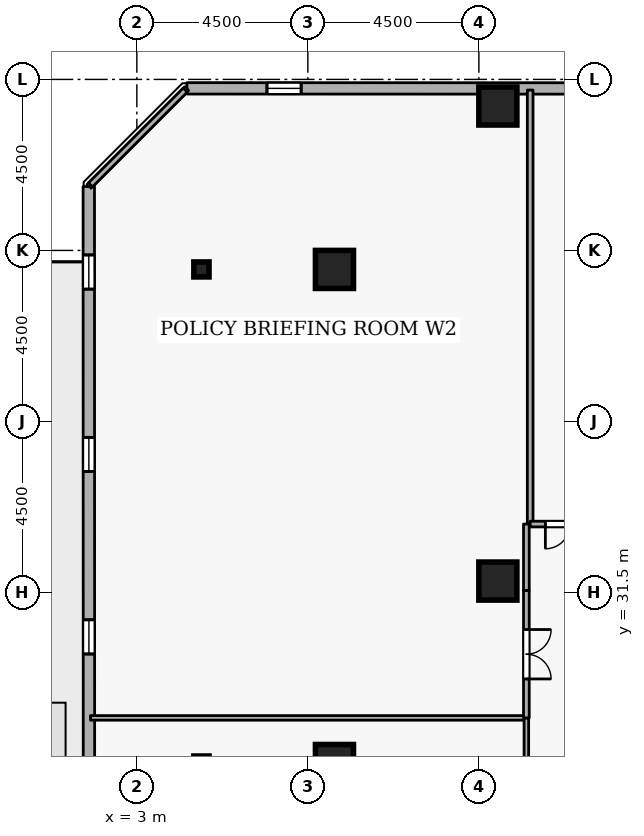
"""IFC4 building model, lengths in metres.
Left out: names, types, materials, properties, quantities, classifications, styles, units other than length and angle.
Written with IfcOpenShell. Run it as: python <this file> out.ifc"""

import sys

from ifc_helpers import new_model, si_unit, direction, frame, frame_2d, origin, origin_2d, place, context, subcontext, project, spatial, rectangle, i_section, extrude, element, fill, save


model = new_model("IFC4")
c1 = context("Model", 3, precision=1e-05, world=origin(), true_north=direction((0.0, 1.0)))
c2 = subcontext(c1, "Body", "Model", "MODEL_VIEW")
j1 = project(units=[si_unit("LENGTHUNIT", "METRE"), si_unit("PLANEANGLEUNIT", "RADIAN")], contexts=[c1])
p1 = place(None, origin())
s1 = spatial("IfcSite", under=j1, at=p1, CompositionType="ELEMENT")
p2 = place(p1, origin())
s2 = spatial("IfcBuilding", under=s1, at=p2, CompositionType="ELEMENT")
p3 = place(p2, frame((0.0, 0.0, 240.3)))
s3 = spatial("IfcBuildingStorey", under=s2, at=p3, CompositionType="ELEMENT", Elevation=240.3)
for number, where, z_axis, x_axis in (
    (1, (12.5, 44.3, 0.0), (0.0, 0.0, 1.0), (1.0, 0.0, 0.0)),
    (2, (8.2, 27.0, 0.0), (0.0, 0.0, 1.0), (1.0, 0.0, 0.0)),
    (3, (8.2, 40.0, 0.0), (0.0, 0.0, 1.0), (1.0, 0.0, 0.0)),
    (4, (12.5, 31.8, 0.0), (0.0, 0.0, 1.0), (1.0, 0.0, 0.0)),
):
    element("IfcColumn", number, at=place(p3, frame(where, z_axis=z_axis, x_axis=x_axis)), inside=s3, PredefinedType="COLUMN", context=c2, shape_type="SweptSolid", body=[
        extrude(rectangle(XDim=1.0, YDim=1.0, at=origin_2d()), origin(), (0.0, 0.0, 1.0), 3.6),
    ])
p4 = place(p3, frame((4.7, 40.0, 0.0), z_axis=(0.0, 0.0, 1.0), x_axis=(1.0, 0.0, 0.0)))
e5 = element("IfcColumn", 5, at=p4, inside=s3, PredefinedType="COLUMN", context=c2, shape_type="SweptSolid", body=[
    extrude(i_section(OverallWidth=0.399, OverallDepth=0.394, WebThickness=0.023, FlangeThickness=0.037, FilletRadius=0.015, at=origin_2d()), origin(), (0.0, 0.0, 1.0), 3.6),
])
p5 = place(p3, frame((37.924, 44.756, 0.0), z_axis=(0.0, 0.0, 1.0), x_axis=(-0.999999963872, 0.000268805477, 0.0)))
e6 = element("IfcWall", 6, at=p5, inside=s3, PredefinedType="STANDARD", context=c2, shape_type="SweptSolid", body=[
    extrude(rectangle(XDim=33.605, YDim=0.3, at=frame_2d((16.802, 0.0))), origin(), (0.0, 0.0, 1.0), 2.7),
])
p6 = place(p5, frame((6.6, 0.0, 0.72)))
e7 = element("IfcOpeningElement", 7, at=p6, cuts=e6, PredefinedType="OPENING", context=c2, shape_type="SweptSolid", body=[
    extrude(rectangle(XDim=0.9, YDim=1.75, at=frame_2d((0.45, 0.875))), frame((0.0, 0.16, 0.0), z_axis=(0.0, -1.0, 0.0), x_axis=(1.0, 0.0, 0.0)), (0.0, 0.0, 1.0), 0.32),
])
p7 = place(p5, frame((16.2, 0.0, 0.72)))
e8 = element("IfcOpeningElement", 8, at=p7, cuts=e6, PredefinedType="OPENING", context=c2, shape_type="SweptSolid", body=[
    extrude(rectangle(XDim=0.9, YDim=1.75, at=frame_2d((0.45, 0.875))), frame((0.0, 0.16, 0.0), z_axis=(0.0, -1.0, 0.0), x_axis=(1.0, 0.0, 0.0)), (0.0, 0.0, 1.0), 0.32),
])
p8 = place(p5, frame((21.0, 0.0, 0.72)))
e9 = element("IfcOpeningElement", 9, at=p8, cuts=e6, PredefinedType="OPENING", context=c2, shape_type="SweptSolid", body=[
    extrude(rectangle(XDim=0.9, YDim=1.75, at=frame_2d((0.45, 0.875))), frame((0.0, 0.16, 0.0), z_axis=(0.0, -1.0, 0.0), x_axis=(1.0, 0.0, 0.0)), (0.0, 0.0, 1.0), 0.32),
])
p9 = place(p5, frame((30.6, 0.0, 0.72)))
e10 = element("IfcOpeningElement", 10, at=p9, cuts=e6, PredefinedType="OPENING", context=c2, shape_type="SweptSolid", body=[
    extrude(rectangle(XDim=0.9, YDim=1.75, at=frame_2d((0.45, 0.875))), frame((0.0, 0.16, 0.0), z_axis=(0.0, -1.0, 0.0), x_axis=(1.0, 0.0, 0.0)), (0.0, 0.0, 1.0), 0.32),
])
p10 = place(p3, frame((1.735, 42.181, 0.0), z_axis=(0.0, 0.0, 1.0), x_axis=(0.000268805477, -0.999999963872, 0.0)))
e11 = element("IfcWall", 11, at=p10, inside=s3, PredefinedType="STANDARD", context=c2, shape_type="SweptSolid", body=[
    extrude(rectangle(XDim=33.605, YDim=0.3, at=frame_2d((16.802, 0.0))), origin(), (0.0, 0.0, 1.0), 2.7),
])
p11 = place(p10, frame((18.603, 0.0, 0.0)))
e12 = element("IfcOpeningElement", 12, at=p11, cuts=e11, PredefinedType="OPENING", context=c2, shape_type="SweptSolid", body=[
    extrude(rectangle(XDim=1.0, YDim=2.08, at=frame_2d((0.5, 1.04))), frame((0.0, 0.16, 0.0), z_axis=(0.0, -1.0, 0.0), x_axis=(1.0, 0.0, 0.0)), (0.0, 0.0, 1.0), 0.32),
])
p12 = place(p10, frame((1.8, 0.0, 0.72)))
e13 = element("IfcOpeningElement", 13, at=p12, cuts=e11, PredefinedType="OPENING", context=c2, shape_type="SweptSolid", body=[
    extrude(rectangle(XDim=0.9, YDim=1.75, at=frame_2d((0.45, 0.875))), frame((0.0, 0.16, 0.0), z_axis=(0.0, -1.0, 0.0), x_axis=(1.0, 0.0, 0.0)), (0.0, 0.0, 1.0), 0.32),
])
p13 = place(p10, frame((6.6, 0.0, 0.72)))
e14 = element("IfcOpeningElement", 14, at=p13, cuts=e11, PredefinedType="OPENING", context=c2, shape_type="SweptSolid", body=[
    extrude(rectangle(XDim=0.9, YDim=1.75, at=frame_2d((0.45, 0.875))), frame((0.0, 0.16, 0.0), z_axis=(0.0, -1.0, 0.0), x_axis=(1.0, 0.0, 0.0)), (0.0, 0.0, 1.0), 0.32),
])
p14 = place(p10, frame((11.4, 0.0, 0.72)))
e15 = element("IfcOpeningElement", 15, at=p14, cuts=e11, PredefinedType="OPENING", context=c2, shape_type="SweptSolid", body=[
    extrude(rectangle(XDim=0.9, YDim=1.75, at=frame_2d((0.45, 0.875))), frame((0.0, 0.16, 0.0), z_axis=(0.0, -1.0, 0.0), x_axis=(1.0, 0.0, 0.0)), (0.0, 0.0, 1.0), 0.32),
])
p15 = place(p10, frame((16.2, 0.0, 0.72)))
e16 = element("IfcOpeningElement", 16, at=p15, cuts=e11, PredefinedType="OPENING", context=c2, shape_type="SweptSolid", body=[
    extrude(rectangle(XDim=0.9, YDim=1.75, at=frame_2d((0.45, 0.875))), frame((0.0, 0.16, 0.0), z_axis=(0.0, -1.0, 0.0), x_axis=(1.0, 0.0, 0.0)), (0.0, 0.0, 1.0), 0.32),
])
p16 = place(p10, frame((21.0, 0.0, 0.72)))
e17 = element("IfcOpeningElement", 17, at=p16, cuts=e11, PredefinedType="OPENING", context=c2, shape_type="SweptSolid", body=[
    extrude(rectangle(XDim=0.9, YDim=1.75, at=frame_2d((0.45, 0.875))), frame((0.0, 0.16, 0.0), z_axis=(0.0, -1.0, 0.0), x_axis=(1.0, 0.0, 0.0)), (0.0, 0.0, 1.0), 0.32),
])
p17 = place(p10, frame((25.8, 0.0, 0.72)))
e18 = element("IfcOpeningElement", 18, at=p17, cuts=e11, PredefinedType="OPENING", context=c2, shape_type="SweptSolid", body=[
    extrude(rectangle(XDim=0.9, YDim=1.75, at=frame_2d((0.45, 0.875))), frame((0.0, 0.16, 0.0), z_axis=(0.0, -1.0, 0.0), x_axis=(1.0, 0.0, 0.0)), (0.0, 0.0, 1.0), 0.32),
])
p18 = place(p10, frame((30.6, 0.0, 0.72)))
e19 = element("IfcOpeningElement", 19, at=p18, cuts=e11, PredefinedType="OPENING", context=c2, shape_type="SweptSolid", body=[
    extrude(rectangle(XDim=0.9, YDim=1.75, at=frame_2d((0.45, 0.875))), frame((0.0, 0.16, 0.0), z_axis=(0.0, -1.0, 0.0), x_axis=(1.0, 0.0, 0.0)), (0.0, 0.0, 1.0), 0.32),
])
p19 = place(p3, frame((13.35, 33.3, 0.0), z_axis=(0.0, 0.0, 1.0), x_axis=(0.0, 1.0, 0.0)))
e20 = element("IfcWall", 20, at=p19, inside=s3, PredefinedType="PARTITIONING", context=c2, shape_type="SweptSolid", body=[
    extrude(rectangle(XDim=11.42, YDim=0.15, at=frame_2d((5.71, 0.0))), origin(), (0.0, 0.0, 1.0), 3.34),
])
p20 = place(p3, frame((15.45, 33.3, 0.0), z_axis=(0.0, 0.0, 1.0), x_axis=(-1.0, 0.0, 0.0)))
e21 = element("IfcWall", 21, at=p20, inside=s3, PredefinedType="PARTITIONING", context=c2, shape_type="SweptSolid", body=[
    extrude(rectangle(XDim=2.1, YDim=0.15, at=frame_2d((1.05, 0.0))), origin(), (0.0, 0.0, 1.0), 3.34),
])
p21 = place(p20, frame((0.4, 0.0, 0.0)))
e22 = element("IfcOpeningElement", 22, at=p21, cuts=e21, PredefinedType="OPENING", context=c2, shape_type="SweptSolid", body=[
    extrude(rectangle(XDim=1.3, YDim=2.12, at=frame_2d((0.65, 1.06))), frame((0.0, 0.085, 0.0), z_axis=(0.0, -1.0, 0.0), x_axis=(1.0, 0.0, 0.0)), (0.0, 0.0, 1.0), 0.17),
])
p22 = place(p3, frame((1.78, 28.2, 0.0), z_axis=(0.0, 0.0, 1.0), x_axis=(1.0, 0.0, 0.0)))
e23 = element("IfcWall", 23, at=p22, inside=s3, PredefinedType="PARTITIONING", context=c2, shape_type="SweptSolid", body=[
    extrude(rectangle(XDim=11.47, YDim=0.12, at=frame_2d((5.735, 0.0))), origin(), (0.0, 0.0, 1.0), 3.34),
])
p23 = place(p3, frame((13.25, 28.2, 0.0), z_axis=(0.0, 0.0, 1.0), x_axis=(0.0, -1.0, 0.0)))
e24 = element("IfcWall", 24, at=p23, inside=s3, PredefinedType="PARTITIONING", context=c2, shape_type="SweptSolid", body=[
    extrude(rectangle(XDim=5.75, YDim=0.12, at=frame_2d((2.875, 0.0))), origin(), (0.0, 0.0, 1.0), 3.34),
])
p24 = place(p23, frame((2.35, 0.0, 0.0)))
e25 = element("IfcOpeningElement", 25, at=p24, cuts=e24, PredefinedType="OPENING", context=c2, shape_type="SweptSolid", body=[
    extrude(rectangle(XDim=1.05, YDim=2.1, at=frame_2d((0.525, 1.05))), frame((0.0, 0.07, 0.0), z_axis=(0.0, -1.0, 0.0), x_axis=(1.0, 0.0, 0.0)), (0.0, 0.0, 1.0), 0.14),
])
p25 = place(p3, frame((1.78, 42.225, 0.0), z_axis=(0.0, 0.0, 1.0), x_axis=(0.707106781187, 0.707106781187, 0.0)))
e26 = element("IfcWall", 26, at=p25, inside=s3, PredefinedType="PARTITIONING", context=c2, shape_type="SweptSolid", body=[
    extrude(rectangle(XDim=3.528, YDim=0.15, at=frame_2d((1.764, 0.0))), origin(), (0.0, 0.0, 1.0), 3.34),
])
p26 = place(p3, frame((13.25, 33.3, 0.0), z_axis=(0.0, 0.0, 1.0), x_axis=(0.0, -1.0, 0.0)))
e27 = element("IfcWall", 27, at=p26, inside=s3, PredefinedType="PARTITIONING", context=c2, shape_type="SweptSolid", body=[
    extrude(rectangle(XDim=1.75, YDim=0.15, at=frame_2d((0.875, 0.0))), origin(), (0.0, 0.0, 1.0), 3.34),
])
p27 = place(p3, frame((13.25, 31.55, 0.0), z_axis=(0.0, 0.0, 1.0), x_axis=(0.0, -1.0, 0.0)))
e28 = element("IfcWall", 28, at=p27, inside=s3, PredefinedType="PARTITIONING", context=c2, shape_type="SweptSolid", body=[
    extrude(rectangle(XDim=3.35, YDim=0.15, at=frame_2d((1.675, 0.0))), origin(), (0.0, 0.0, 1.0), 3.34),
])
p28 = place(p27, frame((1.025, 0.0, 0.0)))
e29 = element("IfcOpeningElement", 29, at=p28, cuts=e28, PredefinedType="OPENING", context=c2, shape_type="SweptSolid", body=[
    extrude(rectangle(XDim=1.3, YDim=2.12, at=frame_2d((0.65, 1.06))), frame((0.0, 0.085, 0.0), z_axis=(0.0, -1.0, 0.0), x_axis=(1.0, 0.0, 0.0)), (0.0, 0.0, 1.0), 0.17),
])
p29 = place(p9, origin())
e30 = element("IfcWindow", 30, at=p29, inside=s3, PartitioningType="SINGLE_PANEL", PredefinedType="WINDOW", context=c2, shape_type="SweptSolid", body=[
    extrude(rectangle(XDim=0.9, YDim=1.75, at=frame_2d((0.45, 0.875))), frame((0.0, 0.03, 0.0), z_axis=(0.0, -1.0, 0.0), x_axis=(1.0, 0.0, 0.0)), (0.0, 0.0, 1.0), 0.06),
])
fill(e10, e30)
p30 = place(p12, origin())
e31 = element("IfcWindow", 31, at=p30, inside=s3, PartitioningType="SINGLE_PANEL", PredefinedType="WINDOW", context=c2, shape_type="SweptSolid", body=[
    extrude(rectangle(XDim=0.9, YDim=1.75, at=frame_2d((0.45, 0.875))), frame((0.0, 0.03, 0.0), z_axis=(0.0, -1.0, 0.0), x_axis=(1.0, 0.0, 0.0)), (0.0, 0.0, 1.0), 0.06),
])
fill(e13, e31)
p31 = place(p13, origin())
e32 = element("IfcWindow", 32, at=p31, inside=s3, PartitioningType="SINGLE_PANEL", PredefinedType="WINDOW", context=c2, shape_type="SweptSolid", body=[
    extrude(rectangle(XDim=0.9, YDim=1.75, at=frame_2d((0.45, 0.875))), frame((0.0, 0.03, 0.0), z_axis=(0.0, -1.0, 0.0), x_axis=(1.0, 0.0, 0.0)), (0.0, 0.0, 1.0), 0.06),
])
fill(e14, e32)
p32 = place(p14, origin())
e33 = element("IfcWindow", 33, at=p32, inside=s3, PartitioningType="SINGLE_PANEL", PredefinedType="WINDOW", context=c2, shape_type="SweptSolid", body=[
    extrude(rectangle(XDim=0.9, YDim=1.75, at=frame_2d((0.45, 0.875))), frame((0.0, 0.03, 0.0), z_axis=(0.0, -1.0, 0.0), x_axis=(1.0, 0.0, 0.0)), (0.0, 0.0, 1.0), 0.06),
])
fill(e15, e33)
p33 = place(p21, origin())
e34 = element("IfcDoor", 34, at=p33, inside=s3, OperationType="DOUBLE_DOOR_SINGLE_SWING", PredefinedType="DOOR", context=c2, shape_type="SweptSolid", body=[
    extrude(rectangle(XDim=1.3, YDim=2.12, at=frame_2d((0.65, 1.06))), frame((0.0, 0.025, 0.0), z_axis=(0.0, -1.0, 0.0), x_axis=(1.0, 0.0, 0.0)), (0.0, 0.0, 1.0), 0.05),
])
fill(e22, e34)
p34 = place(p28, origin())
e35 = element("IfcDoor", 35, at=p34, inside=s3, OperationType="DOUBLE_DOOR_SINGLE_SWING", PredefinedType="DOOR", context=c2, shape_type="SweptSolid", body=[
    extrude(rectangle(XDim=1.3, YDim=2.12, at=frame_2d((0.65, 1.06))), frame((0.0, 0.025, 0.0), z_axis=(0.0, -1.0, 0.0), x_axis=(1.0, 0.0, 0.0)), (0.0, 0.0, 1.0), 0.05),
])
fill(e29, e35)
save(model, sys.argv[1])
